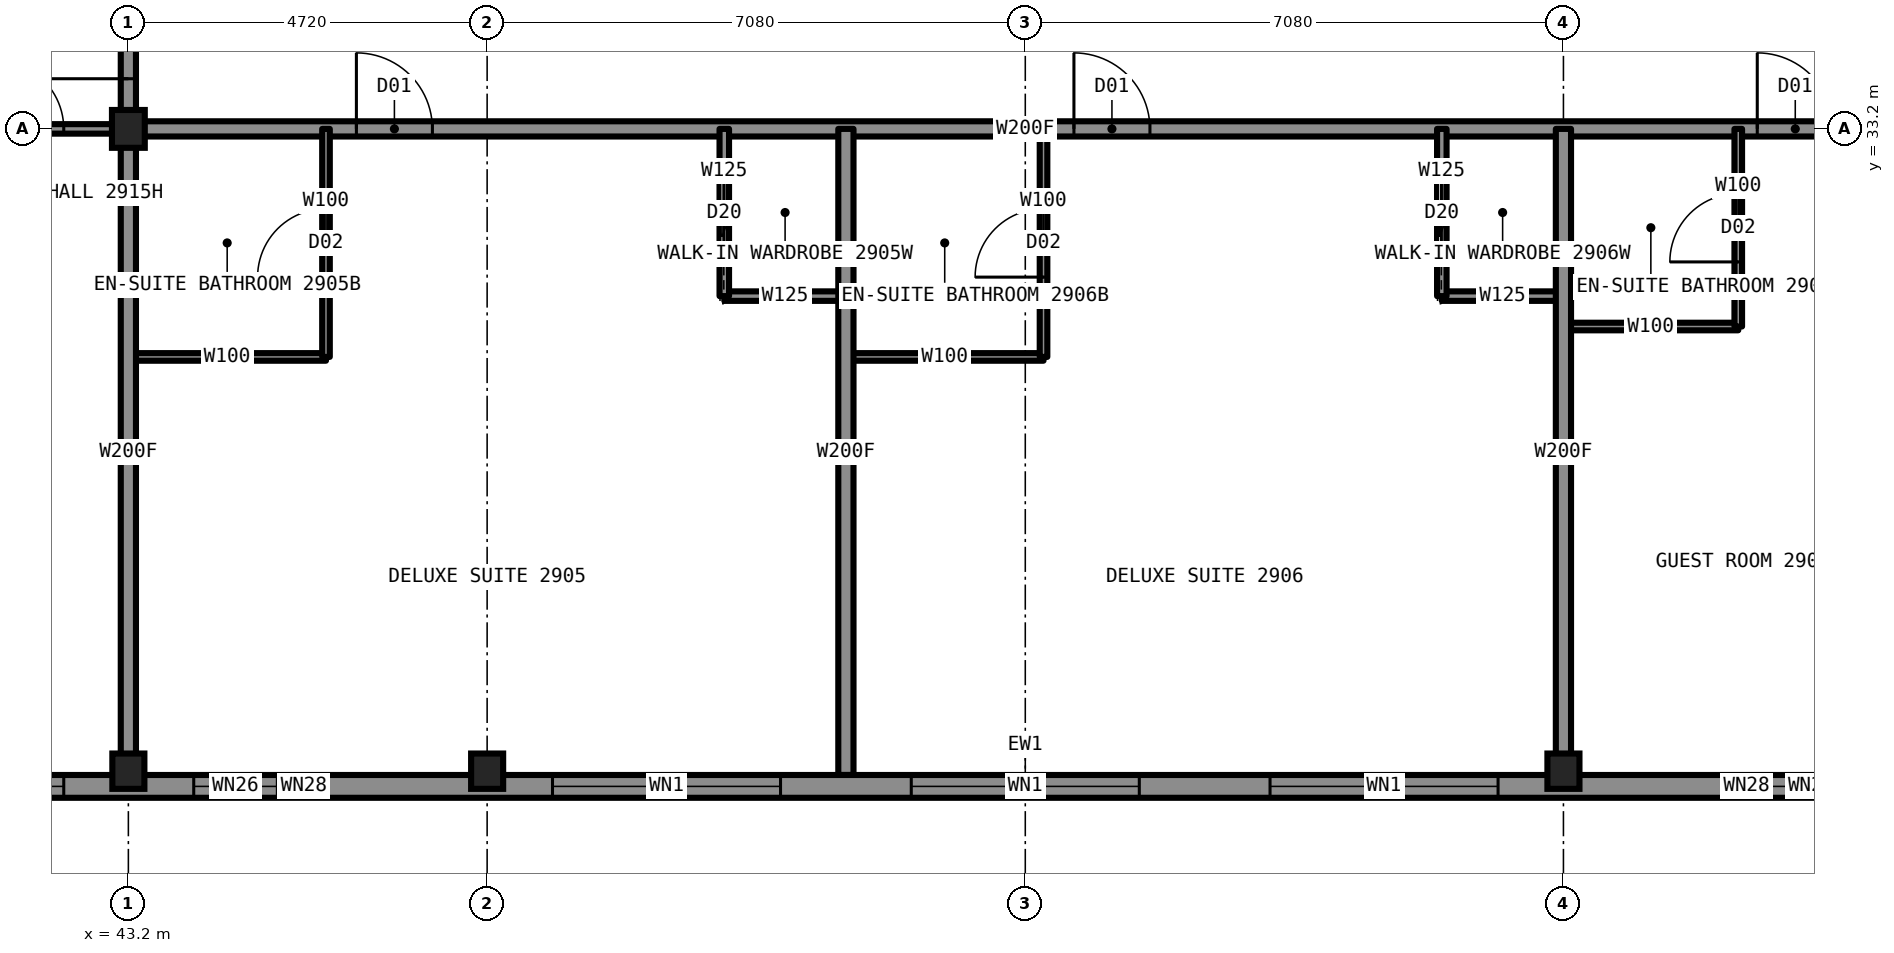
"""IFC4 building model, lengths in metres.
Left out: names, types, materials, properties, quantities, classifications, styles, units other than length and angle.
Written with IfcOpenShell. Run it as: python <this file> out.ifc"""

import sys

from ifc_helpers import new_model, si_unit, direction, frame, frame_2d, origin, origin_2d, place, context, subcontext, project, spatial, rectangle, i_section, extrude, element, fill, save


model = new_model("IFC4")
c1 = context("Model", 3, precision=1e-05, world=origin(), true_north=direction((0.0, 1.0)))
c2 = subcontext(c1, "Body", "Model", "MODEL_VIEW")
j1 = project(units=[si_unit("LENGTHUNIT", "METRE"), si_unit("PLANEANGLEUNIT", "RADIAN")], contexts=[c1])
p1 = place(None, origin())
s1 = spatial("IfcSite", under=j1, at=p1, CompositionType="ELEMENT")
p2 = place(p1, origin())
s2 = spatial("IfcBuilding", under=s1, at=p2, CompositionType="ELEMENT")
p3 = place(p2, frame((0.0, 0.0, 103.9)))
s3 = spatial("IfcBuildingStorey", under=s2, at=p3, CompositionType="ELEMENT", Elevation=103.9)
for number, where, z_axis, x_axis in (
    (1, (43.2, 24.75, 0.0), (0.0, 0.0, 1.0), (1.0, 0.0, 0.0)),
    (2, (47.92, 24.75, 0.0), (0.0, 0.0, 1.0), (1.0, 0.0, 0.0)),
    (3, (62.08, 24.75, 0.0), (0.0, 0.0, 1.0), (1.0, 0.0, 0.0)),
):
    element("IfcColumn", number, at=place(p3, frame(where, z_axis=z_axis, x_axis=x_axis)), inside=s3, PredefinedType="COLUMN", context=c2, shape_type="SweptSolid", body=[
        extrude(i_section(OverallWidth=0.422, OverallDepth=0.465, WebThickness=0.045, FlangeThickness=0.073, at=origin_2d()), origin(), (0.0, 0.0, 1.0), 3.5),
    ])
p4 = place(p3, frame((43.2, 33.2, 0.0), z_axis=(0.0, 0.0, 1.0), x_axis=(1.0, 0.0, 0.0)))
e4 = element("IfcColumn", 4, at=p4, inside=s3, PredefinedType="COLUMN", context=c2, shape_type="SweptSolid", body=[
    extrude(i_section(OverallWidth=0.432, OverallDepth=0.498, WebThickness=0.056, FlangeThickness=0.089, at=origin_2d()), origin(), (0.0, 0.0, 1.0), 3.5),
])
p5 = place(p3, frame((43.2, 33.2, 0.0), z_axis=(0.0, 0.0, 1.0), x_axis=(1.0, 0.0, 0.0)))
e5 = element("IfcWall", 5, at=p5, inside=s3, PredefinedType="PARTITIONING", context=c2, shape_type="SweptSolid", body=[
    extrude(rectangle(XDim=23.6, YDim=0.2, at=frame_2d((11.8, 0.0))), origin(), (0.0, 0.0, 1.0), 3.33),
])
p6 = place(p5, frame((3.0, 0.0, 0.0)))
e6 = element("IfcOpeningElement", 6, at=p6, cuts=e5, PredefinedType="OPENING", context=c2, shape_type="SweptSolid", body=[
    extrude(rectangle(XDim=1.0, YDim=2.2, at=frame_2d((0.5, 1.1))), frame((0.0, 0.11, 0.0), z_axis=(0.0, -1.0, 0.0), x_axis=(1.0, 0.0, 0.0)), (0.0, 0.0, 1.0), 0.22),
])
p7 = place(p5, frame((12.44, 0.0, 0.0)))
e7 = element("IfcOpeningElement", 7, at=p7, cuts=e5, PredefinedType="OPENING", context=c2, shape_type="SweptSolid", body=[
    extrude(rectangle(XDim=1.0, YDim=2.2, at=frame_2d((0.5, 1.1))), frame((0.0, 0.11, 0.0), z_axis=(0.0, -1.0, 0.0), x_axis=(1.0, 0.0, 0.0)), (0.0, 0.0, 1.0), 0.22),
])
p8 = place(p5, frame((21.43, 0.0, 0.0)))
e8 = element("IfcOpeningElement", 8, at=p8, cuts=e5, PredefinedType="OPENING", context=c2, shape_type="SweptSolid", body=[
    extrude(rectangle(XDim=1.0, YDim=2.2, at=frame_2d((0.5, 1.1))), frame((0.0, 0.11, 0.0), z_axis=(0.0, -1.0, 0.0), x_axis=(1.0, 0.0, 0.0)), (0.0, 0.0, 1.0), 0.22),
])
p9 = place(p3, frame((34.7, 33.2, 0.0), z_axis=(0.0, 0.0, 1.0), x_axis=(1.0, 0.0, 0.0)))
e9 = element("IfcWall", 9, at=p9, inside=s3, PredefinedType="PARTITIONING", context=c2, shape_type="SweptSolid", body=[
    extrude(rectangle(XDim=8.5, YDim=0.125, at=frame_2d((4.25, 0.0))), origin(), (0.0, 0.0, 1.0), 2.573),
])
p10 = place(p9, frame((6.75, 0.0, 0.0)))
e10 = element("IfcOpeningElement", 10, at=p10, cuts=e9, PredefinedType="OPENING", context=c2, shape_type="SweptSolid", body=[
    extrude(rectangle(XDim=0.9, YDim=2.2, at=frame_2d((0.45, 1.1))), frame((0.0, 0.073, 0.0), z_axis=(0.0, -1.0, 0.0), x_axis=(1.0, 0.0, 0.0)), (0.0, 0.0, 1.0), 0.145),
])
p11 = place(p3, frame((51.04, 31.0, 0.0), z_axis=(0.0, 0.0, 1.0), x_axis=(1.0, 0.0, 0.0)))
e11 = element("IfcWall", 11, at=p11, inside=s3, PredefinedType="PARTITIONING", context=c2, shape_type="SweptSolid", body=[
    extrude(rectangle(XDim=1.6, YDim=0.125, at=frame_2d((0.8, 0.0))), origin(), (0.0, 0.0, 1.0), 3.33),
])
p12 = place(p3, frame((60.48, 31.0, 0.0), z_axis=(0.0, 0.0, 1.0), x_axis=(1.0, 0.0, 0.0)))
e12 = element("IfcWall", 12, at=p12, inside=s3, PredefinedType="PARTITIONING", context=c2, shape_type="SweptSolid", body=[
    extrude(rectangle(XDim=1.6, YDim=0.125, at=frame_2d((0.8, 0.0))), origin(), (0.0, 0.0, 1.0), 3.33),
])
p13 = place(p3, frame((62.08, 30.6, 0.0), z_axis=(0.0, 0.0, 1.0), x_axis=(1.0, 0.0, 0.0)))
e13 = element("IfcWall", 13, at=p13, inside=s3, PredefinedType="PARTITIONING", context=c2, shape_type="SweptSolid", body=[
    extrude(rectangle(XDim=2.3, YDim=0.1, at=frame_2d((1.15, 0.0))), origin(), (0.0, 0.0, 1.0), 3.33),
])
for number, where, z_axis, x_axis in (
    (14, (43.2, 30.2, 0.0), (0.0, 0.0, 1.0), (1.0, 0.0, 0.0)),
    (15, (52.64, 30.2, 0.0), (0.0, 0.0, 1.0), (1.0, 0.0, 0.0)),
):
    element("IfcWall", number, at=place(p3, frame(where, z_axis=z_axis, x_axis=x_axis)), inside=s3, PredefinedType="PARTITIONING", context=c2, shape_type="SweptSolid", body=[
        extrude(rectangle(XDim=2.6, YDim=0.1, at=frame_2d((1.3, 0.0))), origin(), (0.0, 0.0, 1.0), 3.33),
    ])
p14 = place(p3, frame((43.2, 33.2, 0.0), z_axis=(0.0, 0.0, 1.0), x_axis=(0.0, 1.0, 0.0)))
e16 = element("IfcWall", 16, at=p14, inside=s3, PredefinedType="PARTITIONING", context=c2, shape_type="SweptSolid", body=[
    extrude(rectangle(XDim=23.58, YDim=0.2, at=frame_2d((11.79, 0.0))), origin(), (0.0, 0.0, 1.0), 3.33),
])
p15 = place(p14, frame((7.72, 0.0, 0.0)))
e17 = element("IfcOpeningElement", 17, at=p15, cuts=e16, PredefinedType="OPENING", context=c2, shape_type="SweptSolid", body=[
    extrude(rectangle(XDim=1.0, YDim=2.2, at=frame_2d((0.5, 1.1))), frame((0.0, 0.11, 0.0), z_axis=(0.0, -1.0, 0.0), x_axis=(1.0, 0.0, 0.0)), (0.0, 0.0, 1.0), 0.22),
])
p16 = place(p14, frame((14.56, 0.0, 0.0)))
e18 = element("IfcOpeningElement", 18, at=p16, cuts=e16, PredefinedType="OPENING", context=c2, shape_type="SweptSolid", body=[
    extrude(rectangle(XDim=1.0, YDim=2.2, at=frame_2d((0.5, 1.1))), frame((0.0, 0.11, 0.0), z_axis=(0.0, -1.0, 0.0), x_axis=(1.0, 0.0, 0.0)), (0.0, 0.0, 1.0), 0.22),
])
p17 = place(p14, frame((21.84, 0.0, 0.0)))
e19 = element("IfcOpeningElement", 19, at=p17, cuts=e16, PredefinedType="OPENING", context=c2, shape_type="SweptSolid", body=[
    extrude(rectangle(XDim=1.1, YDim=2.2, at=frame_2d((0.55, 1.1))), frame((0.0, 0.11, 0.0), z_axis=(0.0, -1.0, 0.0), x_axis=(1.0, 0.0, 0.0)), (0.0, 0.0, 1.0), 0.22),
])
p18 = place(p14, frame((0.66, 0.0, 0.0)))
e20 = element("IfcOpeningElement", 20, at=p18, cuts=e16, PredefinedType="OPENING", context=c2, shape_type="SweptSolid", body=[
    extrude(rectangle(XDim=1.1, YDim=2.2, at=frame_2d((0.55, 1.1))), frame((0.0, 0.11, 0.0), z_axis=(0.0, -1.0, 0.0), x_axis=(1.0, 0.0, 0.0)), (0.0, 0.0, 1.0), 0.22),
])
p19 = place(p3, frame((43.2, 24.7, 0.0), z_axis=(0.0, 0.0, 1.0), x_axis=(0.0, 1.0, 0.0)))
e21 = element("IfcWall", 21, at=p19, inside=s3, PredefinedType="PARTITIONING", context=c2, shape_type="SweptSolid", body=[
    extrude(rectangle(XDim=8.5, YDim=0.2, at=frame_2d((4.25, 0.0))), origin(), (0.0, 0.0, 1.0), 2.573),
])
p20 = place(p3, frame((52.64, 24.7, 0.0), z_axis=(0.0, 0.0, 1.0), x_axis=(0.0, 1.0, 0.0)))
e22 = element("IfcWall", 22, at=p20, inside=s3, PredefinedType="PARTITIONING", context=c2, shape_type="SweptSolid", body=[
    extrude(rectangle(XDim=8.5, YDim=0.2, at=frame_2d((4.25, 0.0))), origin(), (0.0, 0.0, 1.0), 3.33),
])
p21 = place(p3, frame((51.04, 31.0, 0.0), z_axis=(0.0, 0.0, 1.0), x_axis=(0.0, 1.0, 0.0)))
e23 = element("IfcWall", 23, at=p21, inside=s3, PredefinedType="PARTITIONING", context=c2, shape_type="SweptSolid", body=[
    extrude(rectangle(XDim=2.2, YDim=0.125, at=frame_2d((1.1, 0.0))), origin(), (0.0, 0.0, 1.0), 3.33),
])
p22 = place(p21, frame((0.7, 0.0, 0.0)))
e24 = element("IfcOpeningElement", 24, at=p22, cuts=e23, PredefinedType="OPENING", context=c2, shape_type="SweptSolid", body=[
    extrude(rectangle(XDim=0.8, YDim=2.1, at=frame_2d((0.4, 1.05))), frame((0.0, 0.073, 0.0), z_axis=(0.0, -1.0, 0.0), x_axis=(1.0, 0.0, 0.0)), (0.0, 0.0, 1.0), 0.145),
])
p23 = place(p3, frame((45.8, 30.2, 0.0), z_axis=(0.0, 0.0, 1.0), x_axis=(0.0, 1.0, 0.0)))
e25 = element("IfcWall", 25, at=p23, inside=s3, PredefinedType="PARTITIONING", context=c2, shape_type="SweptSolid", body=[
    extrude(rectangle(XDim=3.0, YDim=0.1, at=frame_2d((1.5, 0.0))), origin(), (0.0, 0.0, 1.0), 3.33),
])
p24 = place(p23, frame((1.05, 0.0, 0.0)))
e26 = element("IfcOpeningElement", 26, at=p24, cuts=e25, PredefinedType="OPENING", context=c2, shape_type="SweptSolid", body=[
    extrude(rectangle(XDim=0.9, YDim=2.1, at=frame_2d((0.45, 1.05))), frame((0.0, 0.06, 0.0), z_axis=(0.0, -1.0, 0.0), x_axis=(1.0, 0.0, 0.0)), (0.0, 0.0, 1.0), 0.12),
])
p25 = place(p3, frame((55.24, 30.2, 0.0), z_axis=(0.0, 0.0, 1.0), x_axis=(0.0, 1.0, 0.0)))
e27 = element("IfcWall", 27, at=p25, inside=s3, PredefinedType="PARTITIONING", context=c2, shape_type="SweptSolid", body=[
    extrude(rectangle(XDim=3.0, YDim=0.1, at=frame_2d((1.5, 0.0))), origin(), (0.0, 0.0, 1.0), 3.33),
])
p26 = place(p25, frame((1.05, 0.0, 0.0)))
e28 = element("IfcOpeningElement", 28, at=p26, cuts=e27, PredefinedType="OPENING", context=c2, shape_type="SweptSolid", body=[
    extrude(rectangle(XDim=0.9, YDim=2.1, at=frame_2d((0.45, 1.05))), frame((0.0, 0.06, 0.0), z_axis=(0.0, -1.0, 0.0), x_axis=(1.0, 0.0, 0.0)), (0.0, 0.0, 1.0), 0.12),
])
p27 = place(p3, frame((60.48, 31.0, 0.0), z_axis=(0.0, 0.0, 1.0), x_axis=(0.0, 1.0, 0.0)))
e29 = element("IfcWall", 29, at=p27, inside=s3, PredefinedType="PARTITIONING", context=c2, shape_type="SweptSolid", body=[
    extrude(rectangle(XDim=2.2, YDim=0.125, at=frame_2d((1.1, 0.0))), origin(), (0.0, 0.0, 1.0), 3.33),
])
p28 = place(p27, frame((0.7, 0.0, 0.0)))
e30 = element("IfcOpeningElement", 30, at=p28, cuts=e29, PredefinedType="OPENING", context=c2, shape_type="SweptSolid", body=[
    extrude(rectangle(XDim=0.8, YDim=2.1, at=frame_2d((0.4, 1.05))), frame((0.0, 0.073, 0.0), z_axis=(0.0, -1.0, 0.0), x_axis=(1.0, 0.0, 0.0)), (0.0, 0.0, 1.0), 0.145),
])
p29 = place(p3, frame((62.08, 24.7, 0.0), z_axis=(0.0, 0.0, 1.0), x_axis=(0.0, 1.0, 0.0)))
e31 = element("IfcWall", 31, at=p29, inside=s3, PredefinedType="PARTITIONING", context=c2, shape_type="SweptSolid", body=[
    extrude(rectangle(XDim=8.5, YDim=0.2, at=frame_2d((4.25, 0.0))), origin(), (0.0, 0.0, 1.0), 2.573),
])
p30 = place(p3, frame((64.38, 30.6, 0.0), z_axis=(0.0, 0.0, 1.0), x_axis=(0.0, 1.0, 0.0)))
e32 = element("IfcWall", 32, at=p30, inside=s3, PredefinedType="PARTITIONING", context=c2, shape_type="SweptSolid", body=[
    extrude(rectangle(XDim=2.6, YDim=0.1, at=frame_2d((1.3, 0.0))), origin(), (0.0, 0.0, 1.0), 3.33),
])
p31 = place(p30, frame((0.85, 0.0, 0.0)))
e33 = element("IfcOpeningElement", 33, at=p31, cuts=e32, PredefinedType="OPENING", context=c2, shape_type="SweptSolid", body=[
    extrude(rectangle(XDim=0.9, YDim=2.1, at=frame_2d((0.45, 1.05))), frame((0.0, 0.06, 0.0), z_axis=(0.0, -1.0, 0.0), x_axis=(1.0, 0.0, 0.0)), (0.0, 0.0, 1.0), 0.12),
])
p32 = place(p3, frame((39.9, 24.55, 0.0), z_axis=(0.0, 0.0, 1.0), x_axis=(1.0, 0.0, 0.0)))
e34 = element("IfcWall", 34, at=p32, inside=s3, PredefinedType="SOLIDWALL", context=c2, shape_type="SweptSolid", body=[
    extrude(rectangle(XDim=30.2, YDim=0.3, at=frame_2d((15.1, 0.0))), origin(), (0.0, 0.0, 1.0), 2.83),
])
p33 = place(p32, frame((4.16, 0.0, 0.5)))
e35 = element("IfcOpeningElement", 35, at=p33, cuts=e34, PredefinedType="OPENING", context=c2, shape_type="SweptSolid", body=[
    extrude(rectangle(XDim=3.0, YDim=2.0, at=frame_2d((1.5, 1.0))), frame((0.0, 0.16, 0.0), z_axis=(0.0, -1.0, 0.0), x_axis=(1.0, 0.0, 0.0)), (0.0, 0.0, 1.0), 0.32),
])
p34 = place(p32, frame((8.88, 0.0, 0.5)))
e36 = element("IfcOpeningElement", 36, at=p34, cuts=e34, PredefinedType="OPENING", context=c2, shape_type="SweptSolid", body=[
    extrude(rectangle(XDim=3.0, YDim=2.0, at=frame_2d((1.5, 1.0))), frame((0.0, 0.16, 0.0), z_axis=(0.0, -1.0, 0.0), x_axis=(1.0, 0.0, 0.0)), (0.0, 0.0, 1.0), 0.32),
])
p35 = place(p32, frame((13.6, 0.0, 0.5)))
e37 = element("IfcOpeningElement", 37, at=p35, cuts=e34, PredefinedType="OPENING", context=c2, shape_type="SweptSolid", body=[
    extrude(rectangle(XDim=3.0, YDim=2.0, at=frame_2d((1.5, 1.0))), frame((0.0, 0.16, 0.0), z_axis=(0.0, -1.0, 0.0), x_axis=(1.0, 0.0, 0.0)), (0.0, 0.0, 1.0), 0.32),
])
p36 = place(p32, frame((18.32, 0.0, 0.5)))
e38 = element("IfcOpeningElement", 38, at=p36, cuts=e34, PredefinedType="OPENING", context=c2, shape_type="SweptSolid", body=[
    extrude(rectangle(XDim=3.0, YDim=2.0, at=frame_2d((1.5, 1.0))), frame((0.0, 0.16, 0.0), z_axis=(0.0, -1.0, 0.0), x_axis=(1.0, 0.0, 0.0)), (0.0, 0.0, 1.0), 0.32),
])
p37 = place(p32, frame((23.04, 0.0, 0.5)))
e39 = element("IfcOpeningElement", 39, at=p37, cuts=e34, PredefinedType="OPENING", context=c2, shape_type="SweptSolid", body=[
    extrude(rectangle(XDim=3.0, YDim=2.0, at=frame_2d((1.5, 1.0))), frame((0.0, 0.16, 0.0), z_axis=(0.0, -1.0, 0.0), x_axis=(1.0, 0.0, 0.0)), (0.0, 0.0, 1.0), 0.32),
])
p38 = place(p6, origin())
e40 = element("IfcDoor", 40, at=p38, inside=s3, OperationType="SINGLE_SWING_LEFT", PredefinedType="DOOR", context=c2, shape_type="SweptSolid", body=[
    extrude(rectangle(XDim=1.0, YDim=2.2, at=frame_2d((0.5, 1.1))), frame((0.0, 0.025, 0.0), z_axis=(0.0, -1.0, 0.0), x_axis=(1.0, 0.0, 0.0)), (0.0, 0.0, 1.0), 0.05),
])
fill(e6, e40)
p39 = place(p24, origin())
e41 = element("IfcDoor", 41, at=p39, inside=s3, OperationType="SINGLE_SWING_RIGHT", PredefinedType="DOOR", context=c2, shape_type="SweptSolid", body=[
    extrude(rectangle(XDim=0.9, YDim=2.1, at=frame_2d((0.45, 1.05))), frame((0.0, 0.025, 0.0), z_axis=(0.0, -1.0, 0.0), x_axis=(1.0, 0.0, 0.0)), (0.0, 0.0, 1.0), 0.05),
])
fill(e26, e41)
p40 = place(p22, origin())
e42 = element("IfcDoor", 42, at=p40, inside=s3, OperationType="SLIDING_TO_LEFT", PredefinedType="DOOR", context=c2, shape_type="SweptSolid", body=[
    extrude(rectangle(XDim=0.8, YDim=2.1, at=frame_2d((0.4, 1.05))), frame((0.0, 0.025, 0.0), z_axis=(0.0, -1.0, 0.0), x_axis=(1.0, 0.0, 0.0)), (0.0, 0.0, 1.0), 0.05),
])
fill(e24, e42)
p41 = place(p7, origin())
e43 = element("IfcDoor", 43, at=p41, inside=s3, OperationType="SINGLE_SWING_LEFT", PredefinedType="DOOR", context=c2, shape_type="SweptSolid", body=[
    extrude(rectangle(XDim=1.0, YDim=2.2, at=frame_2d((0.5, 1.1))), frame((0.0, 0.025, 0.0), z_axis=(0.0, -1.0, 0.0), x_axis=(1.0, 0.0, 0.0)), (0.0, 0.0, 1.0), 0.05),
])
fill(e7, e43)
p42 = place(p26, origin())
e44 = element("IfcDoor", 44, at=p42, inside=s3, OperationType="SINGLE_SWING_RIGHT", PredefinedType="DOOR", context=c2, shape_type="SweptSolid", body=[
    extrude(rectangle(XDim=0.9, YDim=2.1, at=frame_2d((0.45, 1.05))), frame((0.0, 0.025, 0.0), z_axis=(0.0, -1.0, 0.0), x_axis=(1.0, 0.0, 0.0)), (0.0, 0.0, 1.0), 0.05),
])
fill(e28, e44)
p43 = place(p28, origin())
e45 = element("IfcDoor", 45, at=p43, inside=s3, OperationType="SLIDING_TO_LEFT", PredefinedType="DOOR", context=c2, shape_type="SweptSolid", body=[
    extrude(rectangle(XDim=0.8, YDim=2.1, at=frame_2d((0.4, 1.05))), frame((0.0, 0.025, 0.0), z_axis=(0.0, -1.0, 0.0), x_axis=(1.0, 0.0, 0.0)), (0.0, 0.0, 1.0), 0.05),
])
fill(e30, e45)
p44 = place(p8, origin())
e46 = element("IfcDoor", 46, at=p44, inside=s3, OperationType="SINGLE_SWING_LEFT", PredefinedType="DOOR", context=c2, shape_type="SweptSolid", body=[
    extrude(rectangle(XDim=1.0, YDim=2.2, at=frame_2d((0.5, 1.1))), frame((0.0, 0.025, 0.0), z_axis=(0.0, -1.0, 0.0), x_axis=(1.0, 0.0, 0.0)), (0.0, 0.0, 1.0), 0.05),
])
fill(e8, e46)
p45 = place(p31, origin())
e47 = element("IfcDoor", 47, at=p45, inside=s3, OperationType="SINGLE_SWING_RIGHT", PredefinedType="DOOR", context=c2, shape_type="SweptSolid", body=[
    extrude(rectangle(XDim=0.9, YDim=2.1, at=frame_2d((0.45, 1.05))), frame((0.0, 0.025, 0.0), z_axis=(0.0, -1.0, 0.0), x_axis=(1.0, 0.0, 0.0)), (0.0, 0.0, 1.0), 0.05),
])
fill(e33, e47)
p46 = place(p10, origin())
e48 = element("IfcDoor", 48, at=p46, inside=s3, OperationType="SINGLE_SWING_LEFT", PredefinedType="DOOR", context=c2, shape_type="SweptSolid", body=[
    extrude(rectangle(XDim=0.9, YDim=2.2, at=frame_2d((0.45, 1.1))), frame((0.0, 0.025, 0.0), z_axis=(0.0, -1.0, 0.0), x_axis=(1.0, 0.0, 0.0)), (0.0, 0.0, 1.0), 0.05),
])
fill(e10, e48)
p47 = place(p18, origin())
e49 = element("IfcDoor", 49, at=p47, inside=s3, OperationType="SINGLE_SWING_LEFT", PredefinedType="DOOR", context=c2, shape_type="SweptSolid", body=[
    extrude(rectangle(XDim=1.1, YDim=2.2, at=frame_2d((0.55, 1.1))), frame((0.0, 0.025, 0.0), z_axis=(0.0, -1.0, 0.0), x_axis=(1.0, 0.0, 0.0)), (0.0, 0.0, 1.0), 0.05),
])
fill(e20, e49)
p48 = place(p33, origin())
e50 = element("IfcWindow", 50, at=p48, inside=s3, PartitioningType="SINGLE_PANEL", PredefinedType="WINDOW", context=c2, shape_type="SweptSolid", body=[
    extrude(rectangle(XDim=3.0, YDim=2.0, at=frame_2d((1.5, 1.0))), frame((0.0, 0.03, 0.0), z_axis=(0.0, -1.0, 0.0), x_axis=(1.0, 0.0, 0.0)), (0.0, 0.0, 1.0), 0.06),
])
fill(e35, e50)
p49 = place(p34, origin())
e51 = element("IfcWindow", 51, at=p49, inside=s3, PartitioningType="SINGLE_PANEL", PredefinedType="WINDOW", context=c2, shape_type="SweptSolid", body=[
    extrude(rectangle(XDim=3.0, YDim=2.0, at=frame_2d((1.5, 1.0))), frame((0.0, 0.03, 0.0), z_axis=(0.0, -1.0, 0.0), x_axis=(1.0, 0.0, 0.0)), (0.0, 0.0, 1.0), 0.06),
])
fill(e36, e51)
p50 = place(p35, origin())
e52 = element("IfcWindow", 52, at=p50, inside=s3, PartitioningType="SINGLE_PANEL", PredefinedType="WINDOW", context=c2, shape_type="SweptSolid", body=[
    extrude(rectangle(XDim=3.0, YDim=2.0, at=frame_2d((1.5, 1.0))), frame((0.0, 0.03, 0.0), z_axis=(0.0, -1.0, 0.0), x_axis=(1.0, 0.0, 0.0)), (0.0, 0.0, 1.0), 0.06),
])
fill(e37, e52)
p51 = place(p36, origin())
e53 = element("IfcWindow", 53, at=p51, inside=s3, PartitioningType="SINGLE_PANEL", PredefinedType="WINDOW", context=c2, shape_type="SweptSolid", body=[
    extrude(rectangle(XDim=3.0, YDim=2.0, at=frame_2d((1.5, 1.0))), frame((0.0, 0.03, 0.0), z_axis=(0.0, -1.0, 0.0), x_axis=(1.0, 0.0, 0.0)), (0.0, 0.0, 1.0), 0.06),
])
fill(e38, e53)
p52 = place(p37, origin())
e54 = element("IfcWindow", 54, at=p52, inside=s3, PartitioningType="SINGLE_PANEL", PredefinedType="WINDOW", context=c2, shape_type="SweptSolid", body=[
    extrude(rectangle(XDim=3.0, YDim=2.0, at=frame_2d((1.5, 1.0))), frame((0.0, 0.03, 0.0), z_axis=(0.0, -1.0, 0.0), x_axis=(1.0, 0.0, 0.0)), (0.0, 0.0, 1.0), 0.06),
])
fill(e39, e54)
save(model, sys.argv[1])
